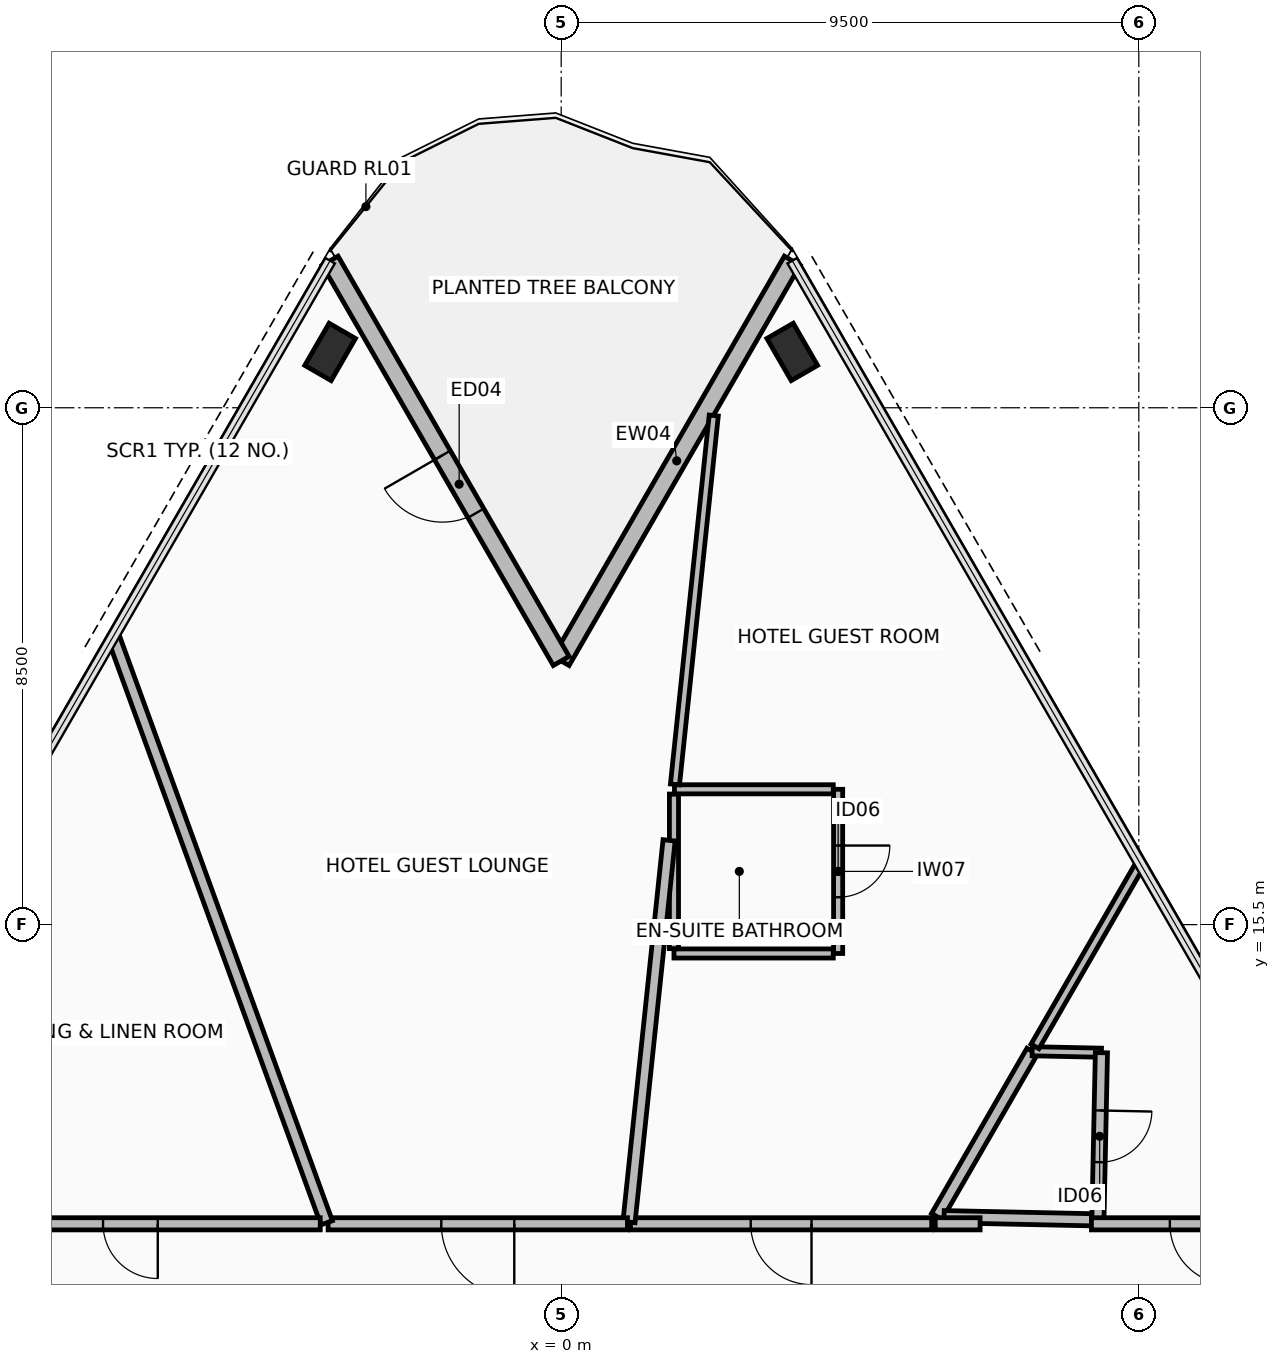
"""IFC4 building model, lengths in metres.
Left out: names, types, materials, properties, quantities, classifications, styles, units other than length and angle.
Written with IfcOpenShell. Run it as: python <this file> out.ifc"""

import sys

from ifc_helpers import new_model, si_unit, direction, frame, frame_2d, origin, origin_2d, place, context, subcontext, project, spatial, rectangle, hollow_rectangle, extrude, element, fill, save


model = new_model("IFC4")
c1 = context("Model", 3, precision=1e-05, world=origin(), true_north=direction((0.0, 1.0)))
c2 = subcontext(c1, "Body", "Model", "MODEL_VIEW")
j1 = project(units=[si_unit("LENGTHUNIT", "METRE"), si_unit("PLANEANGLEUNIT", "RADIAN")], contexts=[c1])
p1 = place(None, origin())
s1 = spatial("IfcSite", under=j1, at=p1, CompositionType="ELEMENT")
p2 = place(p1, origin())
s2 = spatial("IfcBuilding", under=s1, at=p2, CompositionType="ELEMENT")
p3 = place(p2, frame((0.0, 0.0, 35.25)))
s3 = spatial("IfcBuildingStorey", under=s2, at=p3, CompositionType="ELEMENT", Elevation=35.25)
for number, where, z_axis, x_axis in (
    (1, (-3.8, 24.918, 0.0), (0.0, 0.0, 1.0), (0.5, 0.866, 0.0)),
    (2, (3.8, 24.918, 0.0), (0.0, 0.0, 1.0), (-0.5, 0.866, 0.0)),
):
    element("IfcColumn", number, at=place(p3, frame(where, z_axis=z_axis, x_axis=x_axis)), inside=s3, PredefinedType="COLUMN", context=c2, shape_type="SweptSolid", body=[
        extrude(hollow_rectangle(XDim=0.5, YDim=0.8, WallThickness=0.04, at=origin_2d()), origin(), (0.0, 0.0, 1.0), 3.4),
    ])
p4 = place(p3, frame((3.8, 26.418, 0.0), z_axis=(0.0, 0.0, 1.0), x_axis=(-0.500005158081, -0.866022425744, 0.0)))
e3 = element("IfcWall", 3, at=p4, inside=s3, PredefinedType="STANDARD", context=c2, shape_type="SweptSolid", body=[
    extrude(rectangle(XDim=7.6, YDim=0.3, at=frame_2d((3.8, 0.0))), origin(), (0.0, 0.0, 1.0), 2.42),
])
p5 = place(p3, frame((0.0, 19.836, 0.0), z_axis=(0.0, 0.0, 1.0), x_axis=(-0.500005158081, 0.866022425744, 0.0)))
e4 = element("IfcWall", 4, at=p5, inside=s3, PredefinedType="STANDARD", context=c2, shape_type="SweptSolid", body=[
    extrude(rectangle(XDim=7.6, YDim=0.3, at=frame_2d((3.8, 0.0))), origin(), (0.0, 0.0, 1.0), 2.42),
])
p6 = place(p5, frame((2.806, 0.0, 0.0)))
e5 = element("IfcOpeningElement", 5, at=p6, cuts=e4, PredefinedType="OPENING", context=c2, shape_type="SweptSolid", body=[
    extrude(rectangle(XDim=1.1, YDim=2.2, at=frame_2d((0.55, 1.1))), frame((0.0, 0.16, 0.0), z_axis=(0.0, -1.0, 0.0), x_axis=(1.0, 0.0, 0.0)), (0.0, 0.0, 1.0), 0.32),
])
p7 = place(p3, frame((6.177, 10.7, 0.0), z_axis=(0.0, 0.0, 1.0), x_axis=(0.50003000113, 0.866008081931, 0.0)))
e6 = element("IfcWall", 6, at=p7, inside=s3, PredefinedType="PARTITIONING", context=c2, shape_type="SweptSolid", body=[
    extrude(rectangle(XDim=3.138, YDim=0.2, at=frame_2d((1.569, 0.0))), origin(), (0.0, 0.0, 1.0), 2.82),
])
p8 = place(p3, frame((7.747, 13.417, 0.0), z_axis=(0.0, 0.0, 1.0), x_axis=(0.999779226224, -0.02101187308, 0.0)))
e7 = element("IfcWall", 7, at=p8, inside=s3, PredefinedType="PARTITIONING", context=c2, shape_type="SweptSolid", body=[
    extrude(rectangle(XDim=1.139, YDim=0.15, at=frame_2d((0.569, 0.0))), origin(), (0.0, 0.0, 1.0), 2.82),
])
p9 = place(p3, frame((8.885, 13.394, 0.0), z_axis=(0.0, 0.0, 1.0), x_axis=(-0.021041428763, -0.99977860463, 0.0)))
e8 = element("IfcWall", 8, at=p9, inside=s3, PredefinedType="PARTITIONING", context=c2, shape_type="SweptSolid", body=[
    extrude(rectangle(XDim=2.75, YDim=0.2, at=frame_2d((1.375, 0.0))), origin(), (0.0, 0.0, 1.0), 2.82),
])
p10 = place(p9, frame((0.95, 0.0, 0.0)))
e9 = element("IfcOpeningElement", 9, at=p10, cuts=e8, PredefinedType="OPENING", context=c2, shape_type="SweptSolid", body=[
    extrude(rectangle(XDim=0.85, YDim=2.1, at=frame_2d((0.425, 1.05))), frame((0.0, 0.11, 0.0), z_axis=(0.0, -1.0, 0.0), x_axis=(1.0, 0.0, 0.0)), (0.0, 0.0, 1.0), 0.22),
])
p11 = place(p3, frame((8.722, 10.646, 0.0), z_axis=(0.0, 0.0, 1.0), x_axis=(-0.999778667622, 0.021038435515, 0.0)))
e10 = element("IfcWall", 10, at=p11, inside=s3, PredefinedType="PARTITIONING", context=c2, shape_type="SweptSolid", body=[
    extrude(rectangle(XDim=2.425, YDim=0.2, at=frame_2d((1.213, 0.0))), origin(), (0.0, 0.0, 1.0), 2.82),
])
p12 = place(p3, frame((4.555, 17.726, 0.0), z_axis=(0.0, 0.0, 1.0), x_axis=(0.0, -1.0, 0.0)))
e11 = element("IfcWall", 11, at=p12, inside=s3, PredefinedType="PARTITIONING", context=c2, shape_type="SweptSolid", body=[
    extrude(rectangle(XDim=2.7, YDim=0.15, at=frame_2d((1.35, 0.0))), origin(), (0.0, 0.0, 1.0), 3.225),
])
p13 = place(p12, frame((0.925, 0.0, 0.0)))
e12 = element("IfcOpeningElement", 12, at=p13, cuts=e11, PredefinedType="OPENING", context=c2, shape_type="SweptSolid", body=[
    extrude(rectangle(XDim=0.85, YDim=2.1, at=frame_2d((0.425, 1.05))), frame((0.0, 0.085, 0.0), z_axis=(0.0, -1.0, 0.0), x_axis=(1.0, 0.0, 0.0)), (0.0, 0.0, 1.0), 0.17),
])
p14 = place(p3, frame((4.475, 15.025, 0.0), z_axis=(0.0, 0.0, 1.0), x_axis=(-1.0, 0.0, 0.0)))
e13 = element("IfcWall", 13, at=p14, inside=s3, PredefinedType="PARTITIONING", context=c2, shape_type="SweptSolid", body=[
    extrude(rectangle(XDim=2.62, YDim=0.15, at=frame_2d((1.31, 0.0))), origin(), (0.0, 0.0, 1.0), 2.57),
])
p15 = place(p3, frame((1.855, 15.105, 0.0), z_axis=(0.0, 0.0, 1.0), x_axis=(0.0, 1.0, 0.0)))
e14 = element("IfcWall", 14, at=p15, inside=s3, PredefinedType="PARTITIONING", context=c2, shape_type="SweptSolid", body=[
    extrude(rectangle(XDim=2.542, YDim=0.15, at=frame_2d((1.271, 0.0))), origin(), (0.0, 0.0, 1.0), 2.57),
])
p16 = place(p3, frame((1.863, 17.726, 0.0), z_axis=(0.0, 0.0, 1.0), x_axis=(1.0, 0.0, 0.0)))
e15 = element("IfcWall", 15, at=p16, inside=s3, PredefinedType="PARTITIONING", context=c2, shape_type="SweptSolid", body=[
    extrude(rectangle(XDim=2.612, YDim=0.15, at=frame_2d((1.306, 0.0))), origin(), (0.0, 0.0, 1.0), 2.62),
])
p17 = place(p3, frame((12.944, 10.58, 0.0), z_axis=(0.0, 0.0, 1.0), x_axis=(-1.0, 0.0, 0.0)))
e16 = element("IfcWall", 16, at=p17, inside=s3, PredefinedType="PARTITIONING", context=c2, shape_type="SweptSolid", body=[
    extrude(rectangle(XDim=4.223, YDim=0.2, at=frame_2d((2.112, 0.0))), origin(), (0.0, 0.0, 1.0), 2.42),
])
p18 = place(p17, frame((1.934, 0.0, 0.0)))
e17 = element("IfcOpeningElement", 17, at=p18, cuts=e16, PredefinedType="OPENING", context=c2, shape_type="SweptSolid", body=[
    extrude(rectangle(XDim=1.0, YDim=2.15, at=frame_2d((0.5, 1.075))), frame((0.0, 0.11, 0.0), z_axis=(0.0, -1.0, 0.0), x_axis=(1.0, 0.0, 0.0)), (0.0, 0.0, 1.0), 0.22),
])
p19 = place(p3, frame((6.889, 10.58, 0.0), z_axis=(0.0, 0.0, 1.0), x_axis=(-1.0, 0.0, 0.0)))
e18 = element("IfcWall", 18, at=p19, inside=s3, PredefinedType="PARTITIONING", context=c2, shape_type="SweptSolid", body=[
    extrude(rectangle(XDim=0.738, YDim=0.2, at=frame_2d((0.369, 0.0))), origin(), (0.0, 0.0, 1.0), 3.225),
])
p20 = place(p3, frame((7.792, 13.497, 0.0), z_axis=(0.0, 0.0, 1.0), x_axis=(0.500023071514, 0.86601208303, 0.0)))
e19 = element("IfcWall", 19, at=p20, inside=s3, PredefinedType="PARTITIONING", context=c2, shape_type="SweptSolid", body=[
    extrude(rectangle(XDim=3.468, YDim=0.15, at=frame_2d((1.734, 0.0))), origin(), (0.0, 0.0, 1.0), 2.42),
])
p21 = place(p3, frame((6.094, 10.58, 0.0), z_axis=(0.0, 0.0, 1.0), x_axis=(-1.0, 0.0, 0.0)))
e20 = element("IfcWall", 20, at=p21, inside=s3, PredefinedType="PARTITIONING", context=c2, shape_type="SweptSolid", body=[
    extrude(rectangle(XDim=4.954, YDim=0.2, at=frame_2d((2.477, 0.0))), origin(), (0.0, 0.0, 1.0), 2.57),
])
p22 = place(p21, frame((1.977, 0.0, 0.0)))
e21 = element("IfcOpeningElement", 21, at=p22, cuts=e20, PredefinedType="OPENING", context=c2, shape_type="SweptSolid", body=[
    extrude(rectangle(XDim=1.0, YDim=2.15, at=frame_2d((0.5, 1.075))), frame((0.0, 0.11, 0.0), z_axis=(0.0, -1.0, 0.0), x_axis=(1.0, 0.0, 0.0)), (0.0, 0.0, 1.0), 0.22),
])
p23 = place(p3, frame((1.115, 10.608, 0.0), z_axis=(0.0, 0.0, 1.0), x_axis=(0.1045337987, 0.994521334577, 0.0)))
e22 = element("IfcWall", 22, at=p23, inside=s3, PredefinedType="PARTITIONING", context=c2, shape_type="SweptSolid", body=[
    extrude(rectangle(XDim=6.313, YDim=0.2, at=frame_2d((3.156, 0.0))), origin(), (0.0, 0.0, 1.0), 2.57),
])
p24 = place(p3, frame((1.871, 17.805, 0.0), z_axis=(0.0, 0.0, 1.0), x_axis=(0.104534786906, 0.994521230707, 0.0)))
e23 = element("IfcWall", 23, at=p24, inside=s3, PredefinedType="PARTITIONING", context=c2, shape_type="SweptSolid", body=[
    extrude(rectangle(XDim=6.1, YDim=0.15, at=frame_2d((3.05, 0.0))), origin(), (0.0, 0.0, 1.0), 3.225),
])
p25 = place(p3, frame((1.09, 10.58, 0.0), z_axis=(0.0, 0.0, 1.0), x_axis=(-1.0, 0.0, 0.0)))
e24 = element("IfcWall", 24, at=p25, inside=s3, PredefinedType="PARTITIONING", context=c2, shape_type="SweptSolid", body=[
    extrude(rectangle(XDim=4.923, YDim=0.2, at=frame_2d((2.461, 0.0))), origin(), (0.0, 0.0, 1.0), 3.225),
])
p26 = place(p25, frame((1.861, 0.0, 0.0)))
e25 = element("IfcOpeningElement", 25, at=p26, cuts=e24, PredefinedType="OPENING", context=c2, shape_type="SweptSolid", body=[
    extrude(rectangle(XDim=1.2, YDim=2.15, at=frame_2d((0.6, 1.075))), frame((0.0, 0.11, 0.0), z_axis=(0.0, -1.0, 0.0), x_axis=(1.0, 0.0, 0.0)), (0.0, 0.0, 1.0), 0.22),
])
p27 = place(p3, frame((-3.857, 10.596, 0.0), z_axis=(0.0, 0.0, 1.0), x_axis=(-0.342024148249, 0.939691163103, 0.0)))
e26 = element("IfcWall", 26, at=p27, inside=s3, PredefinedType="PARTITIONING", context=c2, shape_type="SweptSolid", body=[
    extrude(rectangle(XDim=10.251, YDim=0.2, at=frame_2d((5.125, 0.0))), origin(), (0.0, 0.0, 1.0), 2.42),
])
p28 = place(p3, frame((-3.963, 10.58, 0.0), z_axis=(0.0, 0.0, 1.0), x_axis=(-1.0, 0.0, 0.0)))
e27 = element("IfcWall", 27, at=p28, inside=s3, PredefinedType="PARTITIONING", context=c2, shape_type="SweptSolid", body=[
    extrude(rectangle(XDim=6.244, YDim=0.2, at=frame_2d((3.122, 0.0))), origin(), (0.0, 0.0, 1.0), 2.62),
])
p29 = place(p28, frame((2.672, 0.0, 0.0)))
e28 = element("IfcOpeningElement", 28, at=p29, cuts=e27, PredefinedType="OPENING", context=c2, shape_type="SweptSolid", body=[
    extrude(rectangle(XDim=0.9, YDim=2.1, at=frame_2d((0.45, 1.05))), frame((0.0, 0.11, 0.0), z_axis=(0.0, -1.0, 0.0), x_axis=(1.0, 0.0, 0.0)), (0.0, 0.0, 1.0), 0.22),
])
p30 = place(p6, frame((1.1, 0.0, 0.0), z_axis=(0.0, 0.0, 1.0), x_axis=(-1.0, 0.0, 0.0)))
e29 = element("IfcDoor", 29, at=p30, inside=s3, OperationType="SINGLE_SWING_LEFT", PredefinedType="DOOR", context=c2, shape_type="SweptSolid", body=[
    extrude(rectangle(XDim=1.1, YDim=2.2, at=frame_2d((0.55, 1.1))), frame((0.0, 0.025, 0.0), z_axis=(0.0, -1.0, 0.0), x_axis=(1.0, 0.0, 0.0)), (0.0, 0.0, 1.0), 0.05),
])
fill(e5, e29)
p31 = place(p10, origin())
e30 = element("IfcDoor", 30, at=p31, inside=s3, OperationType="SINGLE_SWING_RIGHT", PredefinedType="DOOR", context=c2, shape_type="SweptSolid", body=[
    extrude(rectangle(XDim=0.85, YDim=2.1, at=frame_2d((0.425, 1.05))), frame((0.0, 0.025, 0.0), z_axis=(0.0, -1.0, 0.0), x_axis=(1.0, 0.0, 0.0)), (0.0, 0.0, 1.0), 0.05),
])
fill(e9, e30)
p32 = place(p13, origin())
e31 = element("IfcDoor", 31, at=p32, inside=s3, OperationType="SINGLE_SWING_RIGHT", PredefinedType="DOOR", context=c2, shape_type="SweptSolid", body=[
    extrude(rectangle(XDim=0.85, YDim=2.1, at=frame_2d((0.425, 1.05))), frame((0.0, 0.025, 0.0), z_axis=(0.0, -1.0, 0.0), x_axis=(1.0, 0.0, 0.0)), (0.0, 0.0, 1.0), 0.05),
])
fill(e12, e31)
p33 = place(p18, origin())
e32 = element("IfcDoor", 32, at=p33, inside=s3, OperationType="SINGLE_SWING_LEFT", PredefinedType="DOOR", context=c2, shape_type="SweptSolid", body=[
    extrude(rectangle(XDim=1.0, YDim=2.15, at=frame_2d((0.5, 1.075))), frame((0.0, 0.025, 0.0), z_axis=(0.0, -1.0, 0.0), x_axis=(1.0, 0.0, 0.0)), (0.0, 0.0, 1.0), 0.05),
])
fill(e17, e32)
p34 = place(p22, origin())
e33 = element("IfcDoor", 33, at=p34, inside=s3, OperationType="SINGLE_SWING_LEFT", PredefinedType="DOOR", context=c2, shape_type="SweptSolid", body=[
    extrude(rectangle(XDim=1.0, YDim=2.15, at=frame_2d((0.5, 1.075))), frame((0.0, 0.025, 0.0), z_axis=(0.0, -1.0, 0.0), x_axis=(1.0, 0.0, 0.0)), (0.0, 0.0, 1.0), 0.05),
])
fill(e21, e33)
p35 = place(p26, origin())
e34 = element("IfcDoor", 34, at=p35, inside=s3, OperationType="SINGLE_SWING_LEFT", PredefinedType="DOOR", context=c2, shape_type="SweptSolid", body=[
    extrude(rectangle(XDim=1.2, YDim=2.15, at=frame_2d((0.6, 1.075))), frame((0.0, 0.025, 0.0), z_axis=(0.0, -1.0, 0.0), x_axis=(1.0, 0.0, 0.0)), (0.0, 0.0, 1.0), 0.05),
])
fill(e25, e34)
p36 = place(p29, origin())
e35 = element("IfcDoor", 35, at=p36, inside=s3, OperationType="SINGLE_SWING_LEFT", PredefinedType="DOOR", context=c2, shape_type="SweptSolid", body=[
    extrude(rectangle(XDim=0.9, YDim=2.1, at=frame_2d((0.45, 1.05))), frame((0.0, 0.025, 0.0), z_axis=(0.0, -1.0, 0.0), x_axis=(1.0, 0.0, 0.0)), (0.0, 0.0, 1.0), 0.05),
])
fill(e28, e35)
save(model, sys.argv[1])
